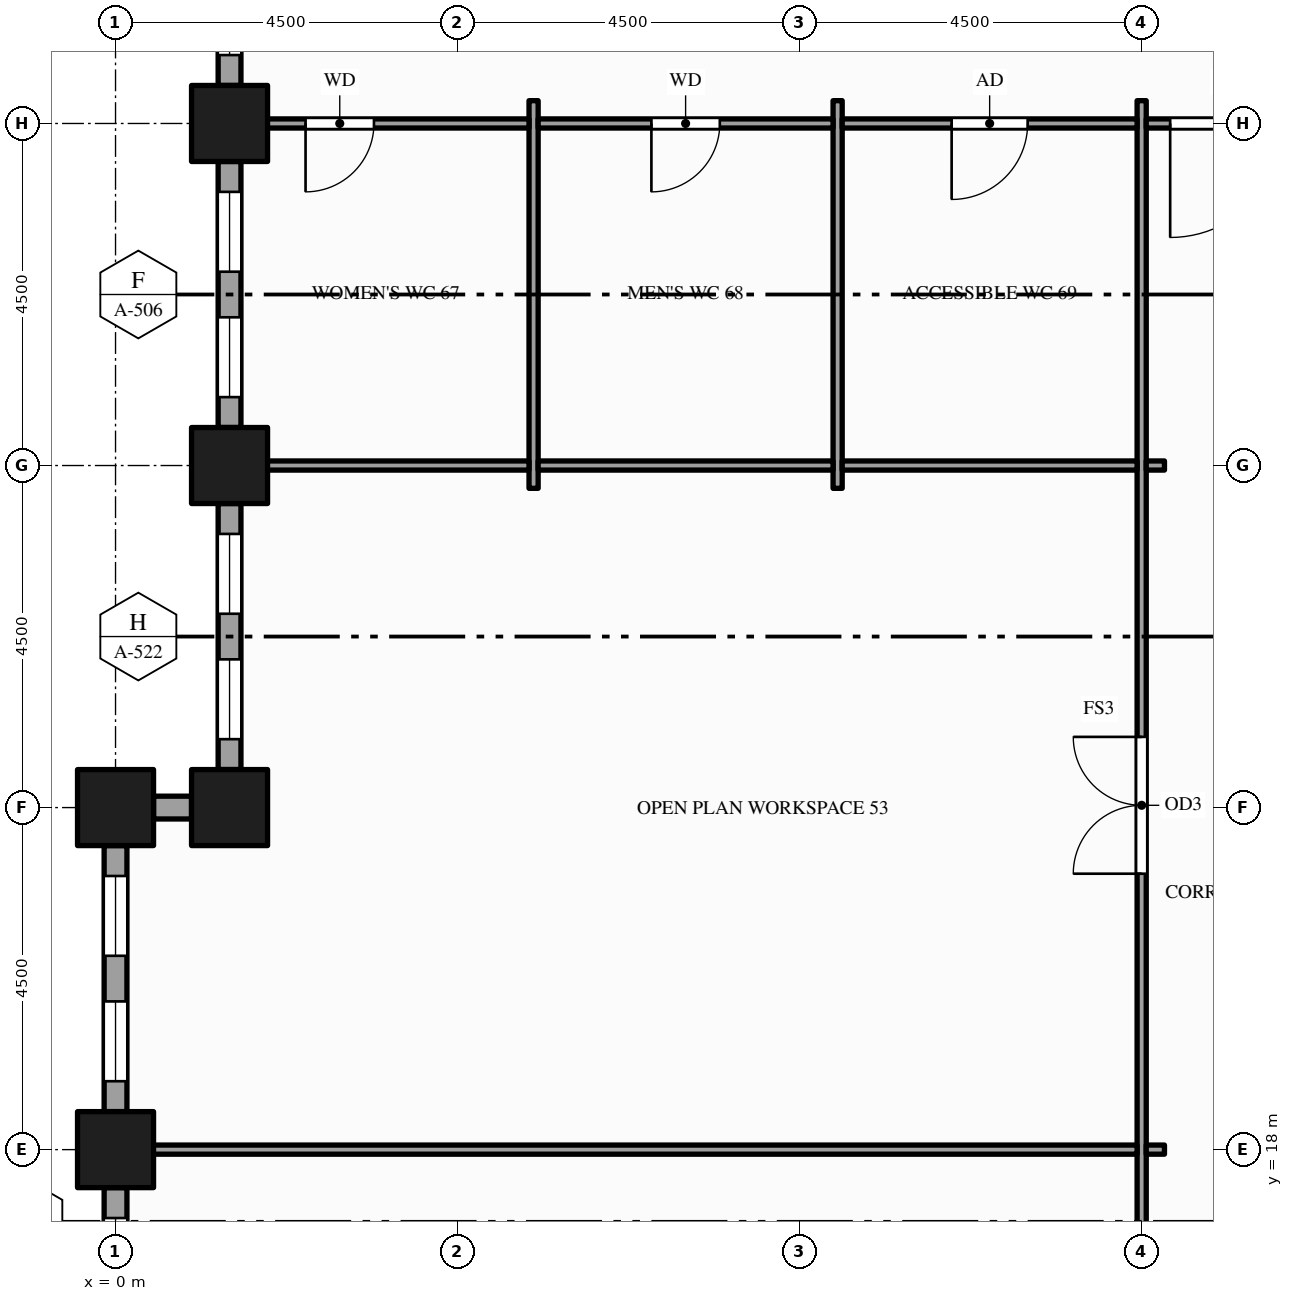
"""IFC4 building model, lengths in metres.
Left out: names, types, materials, properties, quantities, classifications, styles, units other than length and angle.
Written with IfcOpenShell. Run it as: python <this file> out.ifc"""

import sys

from ifc_helpers import new_model, si_unit, direction, frame, frame_2d, origin, origin_2d, place, context, subcontext, project, spatial, rectangle, hollow_rectangle, extrude, element, fill, save


model = new_model("IFC4")
c1 = context("Model", 3, precision=1e-05, world=origin(), true_north=direction((0.0, 1.0)))
c2 = subcontext(c1, "Body", "Model", "MODEL_VIEW")
j1 = project(units=[si_unit("LENGTHUNIT", "METRE"), si_unit("PLANEANGLEUNIT", "RADIAN")], contexts=[c1])
p1 = place(None, origin())
s1 = spatial("IfcSite", under=j1, at=p1, CompositionType="ELEMENT")
p2 = place(p1, origin())
s2 = spatial("IfcBuilding", under=s1, at=p2, CompositionType="ELEMENT")
p3 = place(p2, frame((0.0, 0.0, 119.0)))
s3 = spatial("IfcBuildingStorey", under=s2, at=p3, CompositionType="ELEMENT", Elevation=119.0)
for number, where, z_axis, x_axis in (
    (1, (0.0, 18.0, -0.15), (0.0, 0.0, 1.0), (1.0, 0.0, 0.0)),
    (2, (0.0, 22.5, -0.15), (0.0, 0.0, 1.0), (1.0, 0.0, 0.0)),
    (3, (1.5, 22.5, -0.15), (0.0, 0.0, 1.0), (1.0, 0.0, 0.0)),
    (4, (1.5, 27.0, -0.15), (0.0, 0.0, 1.0), (1.0, 0.0, 0.0)),
    (5, (1.5, 31.5, -0.15), (0.0, 0.0, 1.0), (1.0, 0.0, 0.0)),
):
    element("IfcColumn", number, at=place(p3, frame(where, z_axis=z_axis, x_axis=x_axis)), inside=s3, PredefinedType="COLUMN", context=c2, shape_type="SweptSolid", body=[
        extrude(hollow_rectangle(XDim=1.0, YDim=1.0, WallThickness=0.05, at=origin_2d()), origin(), (0.0, 0.0, 1.0), 4.0),
    ])
p4 = place(p3, frame((1.5, 36.0, 0.0), z_axis=(0.0, 0.0, 1.0), x_axis=(0.0, -1.0, 0.0)))
e6 = element("IfcWall", 6, at=p4, inside=s3, PredefinedType="STANDARD", context=c2, shape_type="SweptSolid", body=[
    extrude(rectangle(XDim=4.0, YDim=0.3, at=frame_2d((2.0, 0.0))), origin(), (0.0, 0.0, 1.0), 3.154),
])
p5 = place(p4, frame((0.4, 0.0, 0.9)))
e7 = element("IfcOpeningElement", 7, at=p5, cuts=e6, PredefinedType="OPENING", context=c2, shape_type="SweptSolid", body=[
    extrude(rectangle(XDim=1.55, YDim=2.0, at=frame_2d((0.775, 1.0))), frame((0.0, 0.16, 0.0), z_axis=(0.0, -1.0, 0.0), x_axis=(1.0, 0.0, 0.0)), (0.0, 0.0, 1.0), 0.32),
])
p6 = place(p4, frame((2.55, 0.0, 0.9)))
e8 = element("IfcOpeningElement", 8, at=p6, cuts=e6, PredefinedType="OPENING", context=c2, shape_type="SweptSolid", body=[
    extrude(rectangle(XDim=1.05, YDim=2.0, at=frame_2d((0.525, 1.0))), frame((0.0, 0.16, 0.0), z_axis=(0.0, -1.0, 0.0), x_axis=(1.0, 0.0, 0.0)), (0.0, 0.0, 1.0), 0.32),
])
p7 = place(p3, frame((1.5, 31.0, 0.0), z_axis=(0.0, 0.0, 1.0), x_axis=(0.0, -1.0, 0.0)))
e9 = element("IfcWall", 9, at=p7, inside=s3, PredefinedType="STANDARD", context=c2, shape_type="SweptSolid", body=[
    extrude(rectangle(XDim=3.5, YDim=0.3, at=frame_2d((1.75, 0.0))), origin(), (0.0, 0.0, 1.0), 3.154),
])
p8 = place(p7, frame((0.4, 0.0, 0.9)))
e10 = element("IfcOpeningElement", 10, at=p8, cuts=e9, PredefinedType="OPENING", context=c2, shape_type="SweptSolid", body=[
    extrude(rectangle(XDim=1.05, YDim=2.0, at=frame_2d((0.525, 1.0))), frame((0.0, 0.16, 0.0), z_axis=(0.0, -1.0, 0.0), x_axis=(1.0, 0.0, 0.0)), (0.0, 0.0, 1.0), 0.32),
])
p9 = place(p7, frame((2.05, 0.0, 0.9)))
e11 = element("IfcOpeningElement", 11, at=p9, cuts=e9, PredefinedType="OPENING", context=c2, shape_type="SweptSolid", body=[
    extrude(rectangle(XDim=1.05, YDim=2.0, at=frame_2d((0.525, 1.0))), frame((0.0, 0.16, 0.0), z_axis=(0.0, -1.0, 0.0), x_axis=(1.0, 0.0, 0.0)), (0.0, 0.0, 1.0), 0.32),
])
p10 = place(p3, frame((1.5, 26.5, 0.0), z_axis=(0.0, 0.0, 1.0), x_axis=(0.0, -1.0, 0.0)))
e12 = element("IfcWall", 12, at=p10, inside=s3, PredefinedType="STANDARD", context=c2, shape_type="SweptSolid", body=[
    extrude(rectangle(XDim=3.5, YDim=0.3, at=frame_2d((1.75, 0.0))), origin(), (0.0, 0.0, 1.0), 3.154),
])
p11 = place(p10, frame((0.4, 0.0, 0.9)))
e13 = element("IfcOpeningElement", 13, at=p11, cuts=e12, PredefinedType="OPENING", context=c2, shape_type="SweptSolid", body=[
    extrude(rectangle(XDim=1.05, YDim=2.0, at=frame_2d((0.525, 1.0))), frame((0.0, 0.16, 0.0), z_axis=(0.0, -1.0, 0.0), x_axis=(1.0, 0.0, 0.0)), (0.0, 0.0, 1.0), 0.32),
])
p12 = place(p10, frame((2.05, 0.0, 0.9)))
e14 = element("IfcOpeningElement", 14, at=p12, cuts=e12, PredefinedType="OPENING", context=c2, shape_type="SweptSolid", body=[
    extrude(rectangle(XDim=1.05, YDim=2.0, at=frame_2d((0.525, 1.0))), frame((0.0, 0.16, 0.0), z_axis=(0.0, -1.0, 0.0), x_axis=(1.0, 0.0, 0.0)), (0.0, 0.0, 1.0), 0.32),
])
p13 = place(p3, frame((1.0, 22.5, 0.0), z_axis=(0.0, 0.0, 1.0), x_axis=(-1.0, 0.0, 0.0)))
e15 = element("IfcWall", 15, at=p13, inside=s3, PredefinedType="STANDARD", context=c2, shape_type="SweptSolid", body=[
    extrude(rectangle(XDim=0.5, YDim=0.3, at=frame_2d((0.25, 0.0))), origin(), (0.0, 0.0, 1.0), 3.154),
])
p14 = place(p3, frame((0.0, 22.0, 0.0), z_axis=(0.0, 0.0, 1.0), x_axis=(0.0, -1.0, 0.0)))
e16 = element("IfcWall", 16, at=p14, inside=s3, PredefinedType="STANDARD", context=c2, shape_type="SweptSolid", body=[
    extrude(rectangle(XDim=3.5, YDim=0.3, at=frame_2d((1.75, 0.0))), origin(), (0.0, 0.0, 1.0), 3.154),
])
p15 = place(p14, frame((0.4, 0.0, 0.9)))
e17 = element("IfcOpeningElement", 17, at=p15, cuts=e16, PredefinedType="OPENING", context=c2, shape_type="SweptSolid", body=[
    extrude(rectangle(XDim=1.05, YDim=2.0, at=frame_2d((0.525, 1.0))), frame((0.0, 0.16, 0.0), z_axis=(0.0, -1.0, 0.0), x_axis=(1.0, 0.0, 0.0)), (0.0, 0.0, 1.0), 0.32),
])
p16 = place(p14, frame((2.05, 0.0, 0.9)))
e18 = element("IfcOpeningElement", 18, at=p16, cuts=e16, PredefinedType="OPENING", context=c2, shape_type="SweptSolid", body=[
    extrude(rectangle(XDim=1.05, YDim=2.0, at=frame_2d((0.525, 1.0))), frame((0.0, 0.16, 0.0), z_axis=(0.0, -1.0, 0.0), x_axis=(1.0, 0.0, 0.0)), (0.0, 0.0, 1.0), 0.32),
])
p17 = place(p3, frame((0.0, 17.5, 0.0), z_axis=(0.0, 0.0, 1.0), x_axis=(0.0, -1.0, 0.0)))
e19 = element("IfcWall", 19, at=p17, inside=s3, PredefinedType="STANDARD", context=c2, shape_type="SweptSolid", body=[
    extrude(rectangle(XDim=3.5, YDim=0.3, at=frame_2d((1.75, 0.0))), origin(), (0.0, 0.0, 1.0), 3.154),
])
p18 = place(p17, frame((0.4, 0.0, 0.9)))
e20 = element("IfcOpeningElement", 20, at=p18, cuts=e19, PredefinedType="OPENING", context=c2, shape_type="SweptSolid", body=[
    extrude(rectangle(XDim=1.05, YDim=2.0, at=frame_2d((0.525, 1.0))), frame((0.0, 0.16, 0.0), z_axis=(0.0, -1.0, 0.0), x_axis=(1.0, 0.0, 0.0)), (0.0, 0.0, 1.0), 0.32),
])
p19 = place(p17, frame((2.05, 0.0, 0.9)))
e21 = element("IfcOpeningElement", 21, at=p19, cuts=e19, PredefinedType="OPENING", context=c2, shape_type="SweptSolid", body=[
    extrude(rectangle(XDim=1.05, YDim=2.0, at=frame_2d((0.525, 1.0))), frame((0.0, 0.16, 0.0), z_axis=(0.0, -1.0, 0.0), x_axis=(1.0, 0.0, 0.0)), (0.0, 0.0, 1.0), 0.32),
])
for number, where, z_axis, x_axis in (
    (22, (5.5, 26.7, 0.0), (0.0, 0.0, 1.0), (0.0, 1.0, 0.0)),
    (23, (9.5, 26.7, 0.0), (0.0, 0.0, 1.0), (0.0, 1.0, 0.0)),
):
    element("IfcWall", number, at=place(p3, frame(where, z_axis=z_axis, x_axis=x_axis)), inside=s3, PredefinedType="PARTITIONING", context=c2, shape_type="SweptSolid", body=[
        extrude(rectangle(XDim=5.1, YDim=0.12, at=frame_2d((2.55, 0.0))), origin(), (0.0, 0.0, 1.0), 3.85),
    ])
p20 = place(p3, frame((13.5, 10.95, 0.0), z_axis=(0.0, 0.0, 1.0), x_axis=(0.0, 1.0, 0.0)))
e24 = element("IfcWall", 24, at=p20, inside=s3, PredefinedType="PARTITIONING", context=c2, shape_type="SweptSolid", body=[
    extrude(rectangle(XDim=20.85, YDim=0.12, at=frame_2d((10.425, 0.0))), origin(), (0.0, 0.0, 1.0), 2.6),
])
p21 = place(p20, frame((3.175, 0.0, 0.0)))
e25 = element("IfcOpeningElement", 25, at=p21, cuts=e24, PredefinedType="OPENING", context=c2, shape_type="SweptSolid", body=[
    extrude(rectangle(XDim=1.0, YDim=2.1, at=frame_2d((0.5, 1.05))), frame((0.0, 0.07, 0.0), z_axis=(0.0, -1.0, 0.0), x_axis=(1.0, 0.0, 0.0)), (0.0, 0.0, 1.0), 0.14),
])
p22 = place(p20, frame((10.68, 0.0, 0.0)))
e26 = element("IfcOpeningElement", 26, at=p22, cuts=e24, PredefinedType="OPENING", context=c2, shape_type="SweptSolid", body=[
    extrude(rectangle(XDim=1.8, YDim=2.1, at=frame_2d((0.9, 1.05))), frame((0.0, 0.07, 0.0), z_axis=(0.0, -1.0, 0.0), x_axis=(1.0, 0.0, 0.0)), (0.0, 0.0, 1.0), 0.14),
])
p23 = place(p3, frame((0.15, 18.0, 0.0), z_axis=(0.0, 0.0, 1.0), x_axis=(1.0, 0.0, 0.0)))
e27 = element("IfcWall", 27, at=p23, inside=s3, PredefinedType="PARTITIONING", context=c2, shape_type="SweptSolid", body=[
    extrude(rectangle(XDim=13.29, YDim=0.12, at=frame_2d((6.645, 0.0))), origin(), (0.0, 0.0, 1.0), 2.938),
])
p24 = place(p3, frame((13.56, 18.0, 0.0), z_axis=(0.0, 0.0, 1.0), x_axis=(1.0, 0.0, 0.0)))
e28 = element("IfcWall", 28, at=p24, inside=s3, PredefinedType="PARTITIONING", context=c2, shape_type="SweptSolid", body=[
    extrude(rectangle(XDim=0.24, YDim=0.12, at=frame_2d((0.12, 0.0))), origin(), (0.0, 0.0, 1.0), 2.938),
])
p25 = place(p3, frame((1.65, 27.0, 0.0), z_axis=(0.0, 0.0, 1.0), x_axis=(1.0, 0.0, 0.0)))
e29 = element("IfcWall", 29, at=p25, inside=s3, PredefinedType="PARTITIONING", context=c2, shape_type="SweptSolid", body=[
    extrude(rectangle(XDim=3.79, YDim=0.12, at=frame_2d((1.895, 0.0))), origin(), (0.0, 0.0, 1.0), 2.938),
])
for number, where, z_axis, x_axis in (
    (30, (5.56, 27.0, 0.0), (0.0, 0.0, 1.0), (1.0, 0.0, 0.0)),
    (31, (9.56, 27.0, 0.0), (0.0, 0.0, 1.0), (1.0, 0.0, 0.0)),
):
    element("IfcWall", number, at=place(p3, frame(where, z_axis=z_axis, x_axis=x_axis)), inside=s3, PredefinedType="PARTITIONING", context=c2, shape_type="SweptSolid", body=[
        extrude(rectangle(XDim=3.88, YDim=0.12, at=frame_2d((1.94, 0.0))), origin(), (0.0, 0.0, 1.0), 2.938),
    ])
p26 = place(p3, frame((13.56, 27.0, 0.0), z_axis=(0.0, 0.0, 1.0), x_axis=(1.0, 0.0, 0.0)))
e32 = element("IfcWall", 32, at=p26, inside=s3, PredefinedType="PARTITIONING", context=c2, shape_type="SweptSolid", body=[
    extrude(rectangle(XDim=0.24, YDim=0.12, at=frame_2d((0.12, 0.0))), origin(), (0.0, 0.0, 1.0), 2.938),
])
p27 = place(p3, frame((1.65, 31.5, 0.0), z_axis=(0.0, 0.0, 1.0), x_axis=(1.0, 0.0, 0.0)))
e33 = element("IfcWall", 33, at=p27, inside=s3, PredefinedType="PARTITIONING", context=c2, shape_type="SweptSolid", body=[
    extrude(rectangle(XDim=3.79, YDim=0.12, at=frame_2d((1.895, 0.0))), origin(), (0.0, 0.0, 1.0), 2.938),
])
p28 = place(p27, frame((0.85, 0.0, 0.0)))
e34 = element("IfcOpeningElement", 34, at=p28, cuts=e33, PredefinedType="OPENING", context=c2, shape_type="SweptSolid", body=[
    extrude(rectangle(XDim=0.9, YDim=2.1, at=frame_2d((0.45, 1.05))), frame((0.0, 0.07, 0.0), z_axis=(0.0, -1.0, 0.0), x_axis=(1.0, 0.0, 0.0)), (0.0, 0.0, 1.0), 0.14),
])
p29 = place(p3, frame((5.56, 31.5, 0.0), z_axis=(0.0, 0.0, 1.0), x_axis=(1.0, 0.0, 0.0)))
e35 = element("IfcWall", 35, at=p29, inside=s3, PredefinedType="PARTITIONING", context=c2, shape_type="SweptSolid", body=[
    extrude(rectangle(XDim=3.88, YDim=0.12, at=frame_2d((1.94, 0.0))), origin(), (0.0, 0.0, 1.0), 2.938),
])
p30 = place(p29, frame((1.49, 0.0, 0.0)))
e36 = element("IfcOpeningElement", 36, at=p30, cuts=e35, PredefinedType="OPENING", context=c2, shape_type="SweptSolid", body=[
    extrude(rectangle(XDim=0.9, YDim=2.1, at=frame_2d((0.45, 1.05))), frame((0.0, 0.07, 0.0), z_axis=(0.0, -1.0, 0.0), x_axis=(1.0, 0.0, 0.0)), (0.0, 0.0, 1.0), 0.14),
])
p31 = place(p3, frame((9.56, 31.5, 0.0), z_axis=(0.0, 0.0, 1.0), x_axis=(1.0, 0.0, 0.0)))
e37 = element("IfcWall", 37, at=p31, inside=s3, PredefinedType="PARTITIONING", context=c2, shape_type="SweptSolid", body=[
    extrude(rectangle(XDim=3.88, YDim=0.12, at=frame_2d((1.94, 0.0))), origin(), (0.0, 0.0, 1.0), 2.938),
])
p32 = place(p31, frame((1.44, 0.0, 0.0)))
e38 = element("IfcOpeningElement", 38, at=p32, cuts=e37, PredefinedType="OPENING", context=c2, shape_type="SweptSolid", body=[
    extrude(rectangle(XDim=1.0, YDim=2.1, at=frame_2d((0.5, 1.05))), frame((0.0, 0.07, 0.0), z_axis=(0.0, -1.0, 0.0), x_axis=(1.0, 0.0, 0.0)), (0.0, 0.0, 1.0), 0.14),
])
p33 = place(p3, frame((13.56, 31.5, 0.0), z_axis=(0.0, 0.0, 1.0), x_axis=(1.0, 0.0, 0.0)))
e39 = element("IfcWall", 39, at=p33, inside=s3, PredefinedType="PARTITIONING", context=c2, shape_type="SweptSolid", body=[
    extrude(rectangle(XDim=2.13, YDim=0.12, at=frame_2d((1.065, 0.0))), origin(), (0.0, 0.0, 1.0), 2.938),
])
p34 = place(p33, frame((0.315, 0.0, 0.0)))
e40 = element("IfcOpeningElement", 40, at=p34, cuts=e39, PredefinedType="OPENING", context=c2, shape_type="SweptSolid", body=[
    extrude(rectangle(XDim=1.5, YDim=2.1, at=frame_2d((0.75, 1.05))), frame((0.0, 0.07, 0.0), z_axis=(0.0, -1.0, 0.0), x_axis=(1.0, 0.0, 0.0)), (0.0, 0.0, 1.0), 0.14),
])
p35 = place(p6, origin())
e41 = element("IfcWindow", 41, at=p35, inside=s3, PartitioningType="SINGLE_PANEL", PredefinedType="WINDOW", context=c2, shape_type="SweptSolid", body=[
    extrude(rectangle(XDim=1.05, YDim=2.0, at=frame_2d((0.525, 1.0))), frame((0.0, 0.03, 0.0), z_axis=(0.0, -1.0, 0.0), x_axis=(1.0, 0.0, 0.0)), (0.0, 0.0, 1.0), 0.06),
])
fill(e8, e41)
p36 = place(p8, origin())
e42 = element("IfcWindow", 42, at=p36, inside=s3, PartitioningType="SINGLE_PANEL", PredefinedType="WINDOW", context=c2, shape_type="SweptSolid", body=[
    extrude(rectangle(XDim=1.05, YDim=2.0, at=frame_2d((0.525, 1.0))), frame((0.0, 0.03, 0.0), z_axis=(0.0, -1.0, 0.0), x_axis=(1.0, 0.0, 0.0)), (0.0, 0.0, 1.0), 0.06),
])
fill(e10, e42)
p37 = place(p9, origin())
e43 = element("IfcWindow", 43, at=p37, inside=s3, PartitioningType="SINGLE_PANEL", PredefinedType="WINDOW", context=c2, shape_type="SweptSolid", body=[
    extrude(rectangle(XDim=1.05, YDim=2.0, at=frame_2d((0.525, 1.0))), frame((0.0, 0.03, 0.0), z_axis=(0.0, -1.0, 0.0), x_axis=(1.0, 0.0, 0.0)), (0.0, 0.0, 1.0), 0.06),
])
fill(e11, e43)
p38 = place(p11, origin())
e44 = element("IfcWindow", 44, at=p38, inside=s3, PartitioningType="SINGLE_PANEL", PredefinedType="WINDOW", context=c2, shape_type="SweptSolid", body=[
    extrude(rectangle(XDim=1.05, YDim=2.0, at=frame_2d((0.525, 1.0))), frame((0.0, 0.03, 0.0), z_axis=(0.0, -1.0, 0.0), x_axis=(1.0, 0.0, 0.0)), (0.0, 0.0, 1.0), 0.06),
])
fill(e13, e44)
p39 = place(p12, origin())
e45 = element("IfcWindow", 45, at=p39, inside=s3, PartitioningType="SINGLE_PANEL", PredefinedType="WINDOW", context=c2, shape_type="SweptSolid", body=[
    extrude(rectangle(XDim=1.05, YDim=2.0, at=frame_2d((0.525, 1.0))), frame((0.0, 0.03, 0.0), z_axis=(0.0, -1.0, 0.0), x_axis=(1.0, 0.0, 0.0)), (0.0, 0.0, 1.0), 0.06),
])
fill(e14, e45)
p40 = place(p15, origin())
e46 = element("IfcWindow", 46, at=p40, inside=s3, PartitioningType="SINGLE_PANEL", PredefinedType="WINDOW", context=c2, shape_type="SweptSolid", body=[
    extrude(rectangle(XDim=1.05, YDim=2.0, at=frame_2d((0.525, 1.0))), frame((0.0, 0.03, 0.0), z_axis=(0.0, -1.0, 0.0), x_axis=(1.0, 0.0, 0.0)), (0.0, 0.0, 1.0), 0.06),
])
fill(e17, e46)
p41 = place(p16, origin())
e47 = element("IfcWindow", 47, at=p41, inside=s3, PartitioningType="SINGLE_PANEL", PredefinedType="WINDOW", context=c2, shape_type="SweptSolid", body=[
    extrude(rectangle(XDim=1.05, YDim=2.0, at=frame_2d((0.525, 1.0))), frame((0.0, 0.03, 0.0), z_axis=(0.0, -1.0, 0.0), x_axis=(1.0, 0.0, 0.0)), (0.0, 0.0, 1.0), 0.06),
])
fill(e18, e47)
p42 = place(p18, origin())
e48 = element("IfcWindow", 48, at=p42, inside=s3, PartitioningType="SINGLE_PANEL", PredefinedType="WINDOW", context=c2, shape_type="SweptSolid", body=[
    extrude(rectangle(XDim=1.05, YDim=2.0, at=frame_2d((0.525, 1.0))), frame((0.0, 0.03, 0.0), z_axis=(0.0, -1.0, 0.0), x_axis=(1.0, 0.0, 0.0)), (0.0, 0.0, 1.0), 0.06),
])
fill(e20, e48)
p43 = place(p34, origin())
e49 = element("IfcDoor", 49, at=p43, inside=s3, OperationType="SINGLE_SWING_LEFT", PredefinedType="DOOR", context=c2, shape_type="SweptSolid", body=[
    extrude(rectangle(XDim=1.5, YDim=2.1, at=frame_2d((0.75, 1.05))), frame((0.0, 0.025, 0.0), z_axis=(0.0, -1.0, 0.0), x_axis=(1.0, 0.0, 0.0)), (0.0, 0.0, 1.0), 0.05),
])
fill(e40, e49)
p44 = place(p22, origin())
e50 = element("IfcDoor", 50, at=p44, inside=s3, OperationType="DOUBLE_DOOR_SINGLE_SWING", PredefinedType="DOOR", context=c2, shape_type="SweptSolid", body=[
    extrude(rectangle(XDim=1.8, YDim=2.1, at=frame_2d((0.9, 1.05))), frame((0.0, 0.025, 0.0), z_axis=(0.0, -1.0, 0.0), x_axis=(1.0, 0.0, 0.0)), (0.0, 0.0, 1.0), 0.05),
])
fill(e26, e50)
p45 = place(p28, origin())
e51 = element("IfcDoor", 51, at=p45, inside=s3, OperationType="SINGLE_SWING_LEFT", PredefinedType="DOOR", context=c2, shape_type="SweptSolid", body=[
    extrude(rectangle(XDim=0.9, YDim=2.1, at=frame_2d((0.45, 1.05))), frame((0.0, 0.025, 0.0), z_axis=(0.0, -1.0, 0.0), x_axis=(1.0, 0.0, 0.0)), (0.0, 0.0, 1.0), 0.05),
])
fill(e34, e51)
p46 = place(p30, origin())
e52 = element("IfcDoor", 52, at=p46, inside=s3, OperationType="SINGLE_SWING_LEFT", PredefinedType="DOOR", context=c2, shape_type="SweptSolid", body=[
    extrude(rectangle(XDim=0.9, YDim=2.1, at=frame_2d((0.45, 1.05))), frame((0.0, 0.025, 0.0), z_axis=(0.0, -1.0, 0.0), x_axis=(1.0, 0.0, 0.0)), (0.0, 0.0, 1.0), 0.05),
])
fill(e36, e52)
p47 = place(p32, origin())
e53 = element("IfcDoor", 53, at=p47, inside=s3, OperationType="SINGLE_SWING_LEFT", PredefinedType="DOOR", context=c2, shape_type="SweptSolid", body=[
    extrude(rectangle(XDim=1.0, YDim=2.1, at=frame_2d((0.5, 1.05))), frame((0.0, 0.025, 0.0), z_axis=(0.0, -1.0, 0.0), x_axis=(1.0, 0.0, 0.0)), (0.0, 0.0, 1.0), 0.05),
])
fill(e38, e53)
save(model, sys.argv[1])
